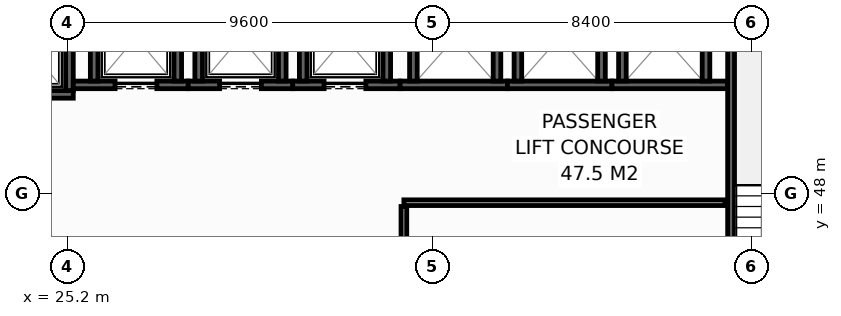
"""IFC4 building model, lengths in metres.
Left out: names, types, materials, properties, quantities, classifications, styles, units other than length and angle.
Written with IfcOpenShell. Run it as: python <this file> out.ifc"""

import sys

from ifc_helpers import new_model, si_unit, direction, frame, frame_2d, origin, place, context, subcontext, project, spatial, rectangle, extrude, element, fill, save


model = new_model("IFC4")
c1 = context("Model", 3, precision=1e-05, world=origin(), true_north=direction((0.0, 1.0)))
c2 = subcontext(c1, "Body", "Model", "MODEL_VIEW")
j1 = project(units=[si_unit("LENGTHUNIT", "METRE"), si_unit("PLANEANGLEUNIT", "RADIAN")], contexts=[c1])
p1 = place(None, origin())
s1 = spatial("IfcSite", under=j1, at=p1, CompositionType="ELEMENT")
p2 = place(p1, origin())
s2 = spatial("IfcBuilding", under=s1, at=p2, CompositionType="ELEMENT")
p3 = place(p2, frame((0.0, 0.0, 82.4)))
s3 = spatial("IfcBuildingStorey", under=s2, at=p3, CompositionType="ELEMENT", Elevation=82.4)
p4 = place(p3, frame((22.5, 50.6, 0.0), z_axis=(0.0, 0.0, 1.0), x_axis=(1.0, 0.0, 0.0)))
e1 = element("IfcWall", 1, at=p4, inside=s3, PredefinedType="SHEAR", context=c2, shape_type="SweptSolid", body=[
    extrude(rectangle(XDim=2.85, YDim=0.2, at=frame_2d((1.425, 0.0))), origin(), (0.0, 0.0, 1.0), 3.95),
])
p5 = place(p4, frame((0.925, 0.0, 0.0)))
e2 = element("IfcOpeningElement", 2, at=p5, cuts=e1, PredefinedType="OPENING", context=c2, shape_type="SweptSolid", body=[
    extrude(rectangle(XDim=1.25, YDim=2.3, at=frame_2d((0.625, 1.15))), frame((0.0, 0.11, 0.0), z_axis=(0.0, -1.0, 0.0), x_axis=(1.0, 0.0, 0.0)), (0.0, 0.0, 1.0), 0.22),
])
p6 = place(p3, frame((25.25, 50.7, 0.0), z_axis=(0.0, 0.0, 1.0), x_axis=(0.0, 1.0, 0.0)))
e3 = element("IfcWall", 3, at=p6, inside=s3, PredefinedType="SHEAR", context=c2, shape_type="SweptSolid", body=[
    extrude(rectangle(XDim=2.6, YDim=0.2, at=frame_2d((1.3, 0.0))), origin(), (0.0, 0.0, 1.0), 3.95),
])
p7 = place(p3, frame((25.35, 50.85, 0.0), z_axis=(0.0, 0.0, 1.0), x_axis=(1.0, 0.0, 0.0)))
e4 = element("IfcWall", 4, at=p7, inside=s3, PredefinedType="SHEAR", context=c2, shape_type="SweptSolid", body=[
    extrude(rectangle(XDim=3.025, YDim=0.2, at=frame_2d((1.512, 0.0))), origin(), (0.0, 0.0, 1.0), 3.95),
])
p8 = place(p7, frame((1.1, 0.0, 0.0)))
e5 = element("IfcOpeningElement", 5, at=p8, cuts=e4, PredefinedType="OPENING", context=c2, shape_type="SweptSolid", body=[
    extrude(rectangle(XDim=1.1, YDim=2.2, at=frame_2d((0.55, 1.1))), frame((0.0, 0.11, 0.0), z_axis=(0.0, -1.0, 0.0), x_axis=(1.0, 0.0, 0.0)), (0.0, 0.0, 1.0), 0.22),
])
for number, where, z_axis, x_axis in (
    (6, (25.9, 50.95, 0.0), (0.0, 0.0, 1.0), (0.0, 1.0, 0.0)),
    (7, (28.1, 50.95, 0.0), (0.0, 0.0, 1.0), (0.0, 1.0, 0.0)),
):
    element("IfcWall", number, at=place(p3, frame(where, z_axis=z_axis, x_axis=x_axis)), inside=s3, PredefinedType="SHEAR", context=c2, shape_type="SweptSolid", body=[
        extrude(rectangle(XDim=2.3, YDim=0.2, at=frame_2d((1.15, 0.0))), origin(), (0.0, 0.0, 1.0), 3.95),
    ])
p9 = place(p3, frame((28.375, 50.85, 0.0), z_axis=(0.0, 0.0, 1.0), x_axis=(1.0, 0.0, 0.0)))
e8 = element("IfcWall", 8, at=p9, inside=s3, PredefinedType="SHEAR", context=c2, shape_type="SweptSolid", body=[
    extrude(rectangle(XDim=2.75, YDim=0.2, at=frame_2d((1.375, 0.0))), origin(), (0.0, 0.0, 1.0), 3.95),
])
p10 = place(p9, frame((0.825, 0.0, 0.0)))
e9 = element("IfcOpeningElement", 9, at=p10, cuts=e8, PredefinedType="OPENING", context=c2, shape_type="SweptSolid", body=[
    extrude(rectangle(XDim=1.1, YDim=2.2, at=frame_2d((0.55, 1.1))), frame((0.0, 0.11, 0.0), z_axis=(0.0, -1.0, 0.0), x_axis=(1.0, 0.0, 0.0)), (0.0, 0.0, 1.0), 0.22),
])
for number, where, z_axis, x_axis in (
    (10, (28.65, 50.95, 0.0), (0.0, 0.0, 1.0), (0.0, 1.0, 0.0)),
    (11, (30.85, 50.95, 0.0), (0.0, 0.0, 1.0), (0.0, 1.0, 0.0)),
):
    element("IfcWall", number, at=place(p3, frame(where, z_axis=z_axis, x_axis=x_axis)), inside=s3, PredefinedType="SHEAR", context=c2, shape_type="SweptSolid", body=[
        extrude(rectangle(XDim=2.3, YDim=0.2, at=frame_2d((1.15, 0.0))), origin(), (0.0, 0.0, 1.0), 3.95),
    ])
p11 = place(p3, frame((31.125, 50.85, 0.0), z_axis=(0.0, 0.0, 1.0), x_axis=(1.0, 0.0, 0.0)))
e12 = element("IfcWall", 12, at=p11, inside=s3, PredefinedType="SHEAR", context=c2, shape_type="SweptSolid", body=[
    extrude(rectangle(XDim=2.825, YDim=0.2, at=frame_2d((1.413, 0.0))), origin(), (0.0, 0.0, 1.0), 3.95),
])
p12 = place(p11, frame((0.825, 0.0, 0.0)))
e13 = element("IfcOpeningElement", 13, at=p12, cuts=e12, PredefinedType="OPENING", context=c2, shape_type="SweptSolid", body=[
    extrude(rectangle(XDim=1.1, YDim=2.2, at=frame_2d((0.55, 1.1))), frame((0.0, 0.11, 0.0), z_axis=(0.0, -1.0, 0.0), x_axis=(1.0, 0.0, 0.0)), (0.0, 0.0, 1.0), 0.22),
])
for number, where, z_axis, x_axis in (
    (14, (31.4, 50.95, 0.0), (0.0, 0.0, 1.0), (0.0, 1.0, 0.0)),
    (15, (33.6, 50.95, 0.0), (0.0, 0.0, 1.0), (0.0, 1.0, 0.0)),
):
    element("IfcWall", number, at=place(p3, frame(where, z_axis=z_axis, x_axis=x_axis)), inside=s3, PredefinedType="SHEAR", context=c2, shape_type="SweptSolid", body=[
        extrude(rectangle(XDim=2.3, YDim=0.2, at=frame_2d((1.15, 0.0))), origin(), (0.0, 0.0, 1.0), 3.95),
    ])
p13 = place(p3, frame((33.95, 50.85, 0.0), z_axis=(0.0, 0.0, 1.0), x_axis=(1.0, 0.0, 0.0)))
e16 = element("IfcWall", 16, at=p13, inside=s3, PredefinedType="SHEAR", context=c2, shape_type="SweptSolid", body=[
    extrude(rectangle(XDim=2.825, YDim=0.2, at=frame_2d((1.413, 0.0))), origin(), (0.0, 0.0, 1.0), 3.95),
])
for number, where, z_axis, x_axis in (
    (17, (34.3, 50.95, 0.0), (0.0, 0.0, 1.0), (0.0, 1.0, 0.0)),
    (18, (36.5, 50.95, 0.0), (0.0, 0.0, 1.0), (0.0, 1.0, 0.0)),
):
    element("IfcWall", number, at=place(p3, frame(where, z_axis=z_axis, x_axis=x_axis)), inside=s3, PredefinedType="SHEAR", context=c2, shape_type="SweptSolid", body=[
        extrude(rectangle(XDim=2.3, YDim=0.2, at=frame_2d((1.15, 0.0))), origin(), (0.0, 0.0, 1.0), 3.95),
    ])
p14 = place(p3, frame((36.775, 50.85, 0.0), z_axis=(0.0, 0.0, 1.0), x_axis=(1.0, 0.0, 0.0)))
e19 = element("IfcWall", 19, at=p14, inside=s3, PredefinedType="SHEAR", context=c2, shape_type="SweptSolid", body=[
    extrude(rectangle(XDim=2.75, YDim=0.2, at=frame_2d((1.375, 0.0))), origin(), (0.0, 0.0, 1.0), 3.95),
])
for number, where, z_axis, x_axis in (
    (20, (37.05, 50.95, 0.0), (0.0, 0.0, 1.0), (0.0, 1.0, 0.0)),
    (21, (39.25, 50.95, 0.0), (0.0, 0.0, 1.0), (0.0, 1.0, 0.0)),
):
    element("IfcWall", number, at=place(p3, frame(where, z_axis=z_axis, x_axis=x_axis)), inside=s3, PredefinedType="SHEAR", context=c2, shape_type="SweptSolid", body=[
        extrude(rectangle(XDim=2.3, YDim=0.2, at=frame_2d((1.15, 0.0))), origin(), (0.0, 0.0, 1.0), 3.95),
    ])
p15 = place(p3, frame((39.525, 50.85, 0.0), z_axis=(0.0, 0.0, 1.0), x_axis=(1.0, 0.0, 0.0)))
e22 = element("IfcWall", 22, at=p15, inside=s3, PredefinedType="SHEAR", context=c2, shape_type="SweptSolid", body=[
    extrude(rectangle(XDim=3.045, YDim=0.2, at=frame_2d((1.522, 0.0))), origin(), (0.0, 0.0, 1.0), 3.95),
])
for number, where, z_axis, x_axis in (
    (23, (39.8, 50.95, 0.0), (0.0, 0.0, 1.0), (0.0, 1.0, 0.0)),
    (24, (42.0, 50.95, 0.0), (0.0, 0.0, 1.0), (0.0, 1.0, 0.0)),
):
    element("IfcWall", number, at=place(p3, frame(where, z_axis=z_axis, x_axis=x_axis)), inside=s3, PredefinedType="SHEAR", context=c2, shape_type="SweptSolid", body=[
        extrude(rectangle(XDim=2.3, YDim=0.2, at=frame_2d((1.15, 0.0))), origin(), (0.0, 0.0, 1.0), 3.95),
    ])
p16 = place(p3, frame((42.66, 53.8, 0.0), z_axis=(0.0, 0.0, 1.0), x_axis=(0.0, -1.0, 0.0)))
e25 = element("IfcWall", 25, at=p16, inside=s3, PredefinedType="SHEAR", context=c2, shape_type="SweptSolid", body=[
    extrude(rectangle(XDim=10.4, YDim=0.18, at=frame_2d((5.2, 0.0))), origin(), (0.0, 0.0, 1.0), 3.95),
])
p17 = place(p16, frame((8.99, 0.0, 0.0)))
e26 = element("IfcOpeningElement", 26, at=p17, cuts=e25, PredefinedType="OPENING", context=c2, shape_type="SweptSolid", body=[
    extrude(rectangle(XDim=1.1, YDim=2.15, at=frame_2d((0.55, 1.075))), frame((0.0, 0.1, 0.0), z_axis=(0.0, -1.0, 0.0), x_axis=(1.0, 0.0, 0.0)), (0.0, 0.0, 1.0), 0.2),
])
p18 = place(p3, frame((34.05, 47.75, 0.0), z_axis=(0.0, 0.0, 1.0), x_axis=(1.0, 0.0, 0.0)))
e27 = element("IfcWall", 27, at=p18, inside=s3, PredefinedType="PARTITIONING", context=c2, shape_type="SweptSolid", body=[
    extrude(rectangle(XDim=8.45, YDim=0.15, at=frame_2d((4.225, 0.0))), origin(), (0.0, 0.0, 1.0), 3.95),
])
p19 = place(p3, frame((34.05, 45.22, 0.0), z_axis=(0.0, 0.0, 1.0), x_axis=(0.0, 1.0, 0.0)))
e28 = element("IfcWall", 28, at=p19, inside=s3, PredefinedType="PARTITIONING", context=c2, shape_type="SweptSolid", body=[
    extrude(rectangle(XDim=2.43, YDim=0.15, at=frame_2d((1.215, 0.0))), origin(), (0.0, 0.0, 1.0), 3.95),
])
p20 = place(p8, origin())
e29 = element("IfcDoor", 29, at=p20, inside=s3, OperationType="SLIDING_TO_LEFT", PredefinedType="DOOR", context=c2, shape_type="SweptSolid", body=[
    extrude(rectangle(XDim=1.1, YDim=2.2, at=frame_2d((0.55, 1.1))), frame((0.0, 0.025, 0.0), z_axis=(0.0, -1.0, 0.0), x_axis=(1.0, 0.0, 0.0)), (0.0, 0.0, 1.0), 0.05),
])
fill(e5, e29)
p21 = place(p10, origin())
e30 = element("IfcDoor", 30, at=p21, inside=s3, OperationType="SLIDING_TO_LEFT", PredefinedType="DOOR", context=c2, shape_type="SweptSolid", body=[
    extrude(rectangle(XDim=1.1, YDim=2.2, at=frame_2d((0.55, 1.1))), frame((0.0, 0.025, 0.0), z_axis=(0.0, -1.0, 0.0), x_axis=(1.0, 0.0, 0.0)), (0.0, 0.0, 1.0), 0.05),
])
fill(e9, e30)
p22 = place(p12, origin())
e31 = element("IfcDoor", 31, at=p22, inside=s3, OperationType="SLIDING_TO_LEFT", PredefinedType="DOOR", context=c2, shape_type="SweptSolid", body=[
    extrude(rectangle(XDim=1.1, YDim=2.2, at=frame_2d((0.55, 1.1))), frame((0.0, 0.025, 0.0), z_axis=(0.0, -1.0, 0.0), x_axis=(1.0, 0.0, 0.0)), (0.0, 0.0, 1.0), 0.05),
])
fill(e13, e31)
save(model, sys.argv[1])
